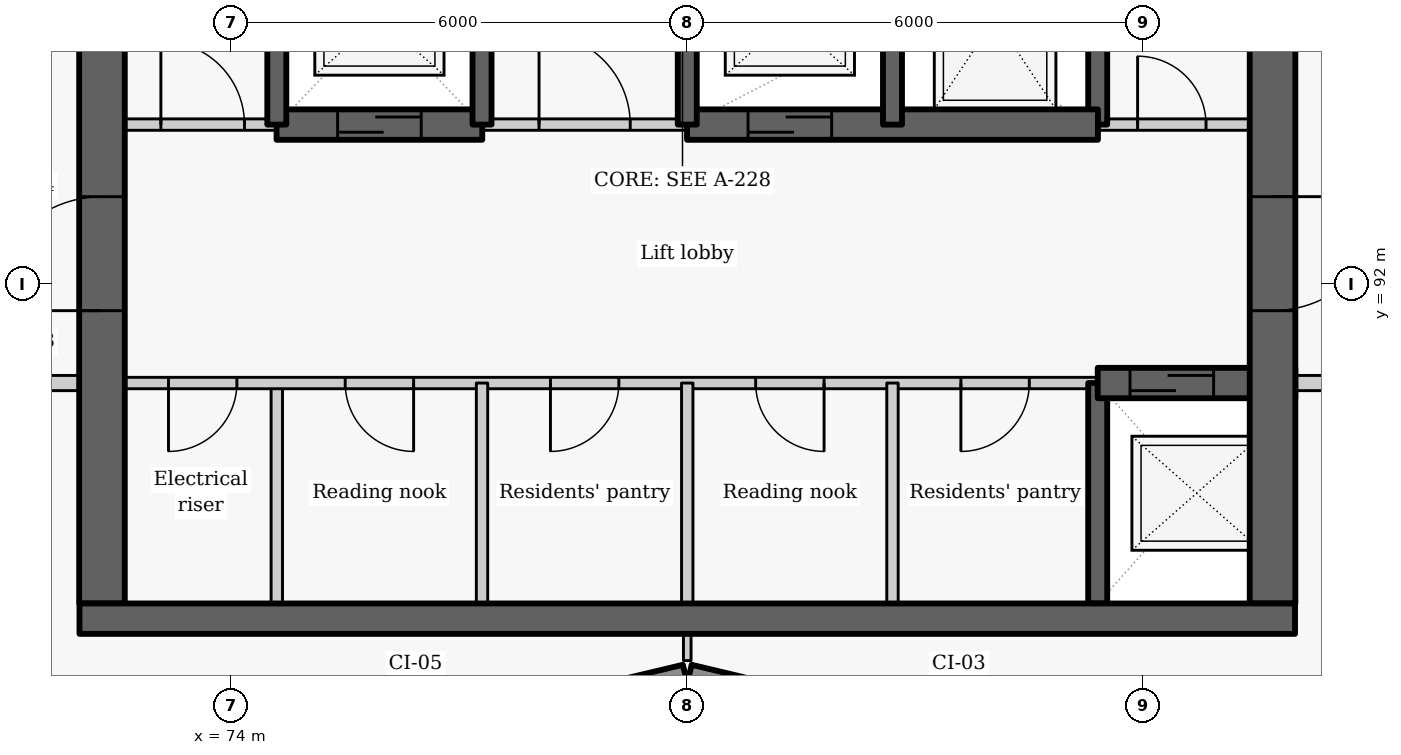
"""IFC4 building model, lengths in metres.
Left out: names, types, materials, properties, quantities, classifications, styles, units other than length and angle.
Written with IfcOpenShell. Run it as: python <this file> out.ifc"""

import sys

from ifc_helpers import new_model, si_unit, direction, frame, frame_2d, origin, place, context, subcontext, project, spatial, rectangle, extrude, element, fill, save


model = new_model("IFC4")
c1 = context("Model", 3, precision=1e-05, world=origin(), true_north=direction((0.0, 1.0)))
c2 = subcontext(c1, "Body", "Model", "MODEL_VIEW")
j1 = project(units=[si_unit("LENGTHUNIT", "METRE"), si_unit("PLANEANGLEUNIT", "RADIAN")], contexts=[c1])
p1 = place(None, origin())
s1 = spatial("IfcSite", under=j1, at=p1, CompositionType="ELEMENT")
p2 = place(p1, origin())
s2 = spatial("IfcBuilding", under=s1, at=p2, CompositionType="ELEMENT")
p3 = place(p2, frame((0.0, 0.0, 160.2)))
s3 = spatial("IfcBuildingStorey", under=s2, at=p3, CompositionType="ELEMENT", Elevation=160.2)
p4 = place(p3, frame((76.814, 86.119, 0.0), z_axis=(0.0, 0.0, 1.0), x_axis=(0.972773113459, 0.231759508395, 0.0)))
e1 = element("IfcWall", 1, at=p4, inside=s3, PredefinedType="SOLIDWALL", context=c2, shape_type="SweptSolid", body=[
    extrude(rectangle(XDim=3.246, YDim=0.25, at=frame_2d((1.623, 0.0))), origin(), (0.0, 0.0, 1.0), 2.425),
])
p5 = place(p4, frame((0.573, 0.0, 0.9)))
e2 = element("IfcOpeningElement", 2, at=p5, cuts=e1, PredefinedType="OPENING", context=c2, shape_type="SweptSolid", body=[
    extrude(rectangle(XDim=2.1, YDim=1.1, at=frame_2d((1.05, 0.55))), frame((0.0, 0.135, 0.0), z_axis=(0.0, -1.0, 0.0), x_axis=(1.0, 0.0, 0.0)), (0.0, 0.0, 1.0), 0.27),
])
p6 = place(p3, frame((80.029, 86.872, 0.0), z_axis=(0.0, 0.0, 1.0), x_axis=(0.972773113459, -0.231759508395, 0.0)))
e3 = element("IfcWall", 3, at=p6, inside=s3, PredefinedType="SOLIDWALL", context=c2, shape_type="SweptSolid", body=[
    extrude(rectangle(XDim=3.246, YDim=0.25, at=frame_2d((1.623, 0.0))), origin(), (0.0, 0.0, 1.0), 2.425),
])
p7 = place(p6, frame((0.573, 0.0, 0.9)))
e4 = element("IfcOpeningElement", 4, at=p7, cuts=e3, PredefinedType="OPENING", context=c2, shape_type="SweptSolid", body=[
    extrude(rectangle(XDim=2.1, YDim=1.1, at=frame_2d((1.05, 0.55))), frame((0.0, 0.135, 0.0), z_axis=(0.0, -1.0, 0.0), x_axis=(1.0, 0.0, 0.0)), (0.0, 0.0, 1.0), 0.27),
])
p8 = place(p3, frame((74.6, 87.8, 0.0), z_axis=(0.0, 0.0, 1.0), x_axis=(0.0, 1.0, 0.0)))
e5 = element("IfcWall", 5, at=p8, inside=s3, PredefinedType="PARTITIONING", context=c2, shape_type="SweptSolid", body=[
    extrude(rectangle(XDim=2.9, YDim=0.15, at=frame_2d((1.45, 0.0))), origin(), (0.0, 0.0, 1.0), 3.025),
])
p9 = place(p3, frame((85.4, 90.7, 0.0), z_axis=(0.0, 0.0, 1.0), x_axis=(-1.0, 0.0, 0.0)))
e6 = element("IfcWall", 6, at=p9, inside=s3, PredefinedType="PARTITIONING", context=c2, shape_type="SweptSolid", body=[
    extrude(rectangle(XDim=13.4, YDim=0.15, at=frame_2d((6.7, 0.0))), origin(), (0.0, 0.0, 1.0), 3.025),
])
p10 = place(p9, frame((11.325, 0.0, 0.0)))
e7 = element("IfcOpeningElement", 7, at=p10, cuts=e6, PredefinedType="OPENING", context=c2, shape_type="SweptSolid", body=[
    extrude(rectangle(XDim=0.9, YDim=2.1, at=frame_2d((0.45, 1.05))), frame((0.0, 0.085, 0.0), z_axis=(0.0, -1.0, 0.0), x_axis=(1.0, 0.0, 0.0)), (0.0, 0.0, 1.0), 0.17),
])
p11 = place(p9, frame((9.0, 0.0, 0.0)))
e8 = element("IfcOpeningElement", 8, at=p11, cuts=e6, PredefinedType="OPENING", context=c2, shape_type="SweptSolid", body=[
    extrude(rectangle(XDim=0.9, YDim=2.1, at=frame_2d((0.45, 1.05))), frame((0.0, 0.085, 0.0), z_axis=(0.0, -1.0, 0.0), x_axis=(1.0, 0.0, 0.0)), (0.0, 0.0, 1.0), 0.17),
])
p12 = place(p9, frame((6.3, 0.0, 0.0)))
e9 = element("IfcOpeningElement", 9, at=p12, cuts=e6, PredefinedType="OPENING", context=c2, shape_type="SweptSolid", body=[
    extrude(rectangle(XDim=0.9, YDim=2.1, at=frame_2d((0.45, 1.05))), frame((0.0, 0.085, 0.0), z_axis=(0.0, -1.0, 0.0), x_axis=(1.0, 0.0, 0.0)), (0.0, 0.0, 1.0), 0.17),
])
p13 = place(p9, frame((3.6, 0.0, 0.0)))
e10 = element("IfcOpeningElement", 10, at=p13, cuts=e6, PredefinedType="OPENING", context=c2, shape_type="SweptSolid", body=[
    extrude(rectangle(XDim=0.9, YDim=2.1, at=frame_2d((0.45, 1.05))), frame((0.0, 0.085, 0.0), z_axis=(0.0, -1.0, 0.0), x_axis=(1.0, 0.0, 0.0)), (0.0, 0.0, 1.0), 0.17),
])
p14 = place(p9, frame((0.9, 0.0, 0.0)))
e11 = element("IfcOpeningElement", 11, at=p14, cuts=e6, PredefinedType="OPENING", context=c2, shape_type="SweptSolid", body=[
    extrude(rectangle(XDim=0.9, YDim=2.1, at=frame_2d((0.45, 1.05))), frame((0.0, 0.085, 0.0), z_axis=(0.0, -1.0, 0.0), x_axis=(1.0, 0.0, 0.0)), (0.0, 0.0, 1.0), 0.17),
])
p15 = place(p3, frame((72.3, 87.8, -0.275), z_axis=(0.0, 0.0, 1.0), x_axis=(0.0, 1.0, 0.0)))
e12 = element("IfcWall", 12, at=p15, inside=s3, PredefinedType="SHEAR", context=c2, shape_type="SweptSolid", body=[
    extrude(rectangle(XDim=9.1, YDim=0.6, at=frame_2d((4.55, 0.0))), origin(), (0.0, 0.0, 1.0), 3.3),
])
p16 = place(p15, frame((3.852, 0.0, 0.275)))
e13 = element("IfcOpeningElement", 13, at=p16, cuts=e12, PredefinedType="OPENING", context=c2, shape_type="SweptSolid", body=[
    extrude(rectangle(XDim=1.5, YDim=2.1, at=frame_2d((0.75, 1.05))), frame((0.0, 0.31, 0.0), z_axis=(0.0, -1.0, 0.0), x_axis=(1.0, 0.0, 0.0)), (0.0, 0.0, 1.0), 0.62),
])
p17 = place(p3, frame((85.4, 87.8, -0.275), z_axis=(0.0, 0.0, 1.0), x_axis=(0.0, 1.0, 0.0)))
e14 = element("IfcWall", 14, at=p17, inside=s3, PredefinedType="SHEAR", context=c2, shape_type="SweptSolid", body=[
    extrude(rectangle(XDim=2.9, YDim=0.25, at=frame_2d((1.45, 0.0))), origin(), (0.0, 0.0, 1.0), 3.3),
])
p18 = place(p3, frame((85.4, 94.1, -0.275), z_axis=(0.0, 0.0, 1.0), x_axis=(0.0, 1.0, 0.0)))
e15 = element("IfcWall", 15, at=p18, inside=s3, PredefinedType="SHEAR", context=c2, shape_type="SweptSolid", body=[
    extrude(rectangle(XDim=2.8, YDim=0.25, at=frame_2d((1.4, 0.0))), origin(), (0.0, 0.0, 1.0), 3.3),
])
p19 = place(p3, frame((85.4, 90.7, -0.275), z_axis=(0.0, 0.0, 1.0), x_axis=(1.0, 0.0, 0.0)))
e16 = element("IfcWall", 16, at=p19, inside=s3, PredefinedType="SHEAR", context=c2, shape_type="SweptSolid", body=[
    extrude(rectangle(XDim=2.6, YDim=0.4, at=frame_2d((1.3, 0.0))), origin(), (0.0, 0.0, 1.0), 3.3),
])
p20 = place(p19, frame((0.425, 0.0, 0.275)))
e17 = element("IfcOpeningElement", 17, at=p20, cuts=e16, PredefinedType="OPENING", context=c2, shape_type="SweptSolid", body=[
    extrude(rectangle(XDim=1.1, YDim=2.1, at=frame_2d((0.55, 1.05))), frame((0.0, 0.21, 0.0), z_axis=(0.0, -1.0, 0.0), x_axis=(1.0, 0.0, 0.0)), (0.0, 0.0, 1.0), 0.42),
])
p21 = place(p3, frame((87.7, 103.4, -0.275), z_axis=(0.0, 0.0, 1.0), x_axis=(0.0, -1.0, 0.0)))
e18 = element("IfcWall", 18, at=p21, inside=s3, PredefinedType="SHEAR", context=c2, shape_type="SweptSolid", body=[
    extrude(rectangle(XDim=15.6, YDim=0.6, at=frame_2d((7.8, 0.0))), origin(), (0.0, 0.0, 1.0), 3.3),
])
p22 = place(p21, frame((10.248, 0.0, 0.275)))
e19 = element("IfcOpeningElement", 19, at=p22, cuts=e18, PredefinedType="OPENING", context=c2, shape_type="SweptSolid", body=[
    extrude(rectangle(XDim=1.5, YDim=2.1, at=frame_2d((0.75, 1.05))), frame((0.0, 0.31, 0.0), z_axis=(0.0, -1.0, 0.0), x_axis=(1.0, 0.0, 0.0)), (0.0, 0.0, 1.0), 0.62),
])
for number, where, z_axis, x_axis in (
    (20, (77.3, 87.8, 0.0), (0.0, 0.0, 1.0), (0.0, 1.0, 0.0)),
    (21, (80.0, 87.8, 0.0), (0.0, 0.0, 1.0), (0.0, 1.0, 0.0)),
    (22, (82.7, 87.8, 0.0), (0.0, 0.0, 1.0), (0.0, 1.0, 0.0)),
):
    element("IfcWall", number, at=place(p3, frame(where, z_axis=z_axis, x_axis=x_axis)), inside=s3, PredefinedType="PARTITIONING", context=c2, shape_type="SweptSolid", body=[
        extrude(rectangle(XDim=2.9, YDim=0.15, at=frame_2d((1.45, 0.0))), origin(), (0.0, 0.0, 1.0), 3.025),
    ])
p23 = place(p3, frame((72.0, 94.1, 0.0), z_axis=(0.0, 0.0, 1.0), x_axis=(1.0, 0.0, 0.0)))
e23 = element("IfcWall", 23, at=p23, inside=s3, PredefinedType="PARTITIONING", context=c2, shape_type="SweptSolid", body=[
    extrude(rectangle(XDim=2.603, YDim=0.15, at=frame_2d((1.302, 0.0))), origin(), (0.0, 0.0, 1.0), 3.025),
])
p24 = place(p23, frame((1.075, 0.0, 0.0)))
e24 = element("IfcOpeningElement", 24, at=p24, cuts=e23, PredefinedType="OPENING", context=c2, shape_type="SweptSolid", body=[
    extrude(rectangle(XDim=1.1, YDim=2.1, at=frame_2d((0.55, 1.05))), frame((0.0, 0.085, 0.0), z_axis=(0.0, -1.0, 0.0), x_axis=(1.0, 0.0, 0.0)), (0.0, 0.0, 1.0), 0.17),
])
p25 = place(p3, frame((77.297, 94.1, 0.0), z_axis=(0.0, 0.0, 1.0), x_axis=(1.0, 0.0, 0.0)))
e25 = element("IfcWall", 25, at=p25, inside=s3, PredefinedType="PARTITIONING", context=c2, shape_type="SweptSolid", body=[
    extrude(rectangle(XDim=2.706, YDim=0.15, at=frame_2d((1.353, 0.0))), origin(), (0.0, 0.0, 1.0), 3.025),
])
p26 = place(p25, frame((0.753, 0.0, 0.0)))
e26 = element("IfcOpeningElement", 26, at=p26, cuts=e25, PredefinedType="OPENING", context=c2, shape_type="SweptSolid", body=[
    extrude(rectangle(XDim=1.2, YDim=2.1, at=frame_2d((0.6, 1.05))), frame((0.0, 0.085, 0.0), z_axis=(0.0, -1.0, 0.0), x_axis=(1.0, 0.0, 0.0)), (0.0, 0.0, 1.0), 0.17),
])
p27 = place(p3, frame((85.397, 94.1, 0.0), z_axis=(0.0, 0.0, 1.0), x_axis=(1.0, 0.0, 0.0)))
e27 = element("IfcWall", 27, at=p27, inside=s3, PredefinedType="PARTITIONING", context=c2, shape_type="SweptSolid", body=[
    extrude(rectangle(XDim=2.603, YDim=0.15, at=frame_2d((1.302, 0.0))), origin(), (0.0, 0.0, 1.0), 3.025),
])
p28 = place(p27, frame((0.528, 0.0, 0.0)))
e28 = element("IfcOpeningElement", 28, at=p28, cuts=e27, PredefinedType="OPENING", context=c2, shape_type="SweptSolid", body=[
    extrude(rectangle(XDim=0.9, YDim=2.1, at=frame_2d((0.45, 1.05))), frame((0.0, 0.085, 0.0), z_axis=(0.0, -1.0, 0.0), x_axis=(1.0, 0.0, 0.0)), (0.0, 0.0, 1.0), 0.17),
])
p29 = place(p3, frame((74.597, 94.1, -0.275), z_axis=(0.0, 0.0, 1.0), x_axis=(1.0, 0.0, 0.0)))
e29 = element("IfcWall", 29, at=p29, inside=s3, PredefinedType="SHEAR", context=c2, shape_type="SweptSolid", body=[
    extrude(rectangle(XDim=2.706, YDim=0.4, at=frame_2d((1.353, 0.0))), origin(), (0.0, 0.0, 1.0), 3.3),
])
p30 = place(p29, frame((0.803, 0.0, 0.275)))
e30 = element("IfcOpeningElement", 30, at=p30, cuts=e29, PredefinedType="OPENING", context=c2, shape_type="SweptSolid", body=[
    extrude(rectangle(XDim=1.1, YDim=2.1, at=frame_2d((0.55, 1.05))), frame((0.0, 0.21, 0.0), z_axis=(0.0, -1.0, 0.0), x_axis=(1.0, 0.0, 0.0)), (0.0, 0.0, 1.0), 0.42),
])
p31 = place(p3, frame((79.997, 94.1, -0.275), z_axis=(0.0, 0.0, 1.0), x_axis=(1.0, 0.0, 0.0)))
e31 = element("IfcWall", 31, at=p31, inside=s3, PredefinedType="SHEAR", context=c2, shape_type="SweptSolid", body=[
    extrude(rectangle(XDim=5.406, YDim=0.4, at=frame_2d((2.703, 0.0))), origin(), (0.0, 0.0, 1.0), 3.3),
])
p32 = place(p31, frame((0.803, 0.0, 0.275)))
e32 = element("IfcOpeningElement", 32, at=p32, cuts=e31, PredefinedType="OPENING", context=c2, shape_type="SweptSolid", body=[
    extrude(rectangle(XDim=1.1, YDim=2.1, at=frame_2d((0.55, 1.05))), frame((0.0, 0.21, 0.0), z_axis=(0.0, -1.0, 0.0), x_axis=(1.0, 0.0, 0.0)), (0.0, 0.0, 1.0), 0.42),
])
for number, where, z_axis, x_axis in (
    (33, (74.6, 94.1, -0.275), (0.0, 0.0, 1.0), (0.0, 1.0, 0.0)),
    (34, (77.3, 94.1, -0.275), (0.0, 0.0, 1.0), (0.0, 1.0, 0.0)),
    (35, (80.0, 94.1, -0.275), (0.0, 0.0, 1.0), (0.0, 1.0, 0.0)),
    (36, (82.7, 94.1, -0.275), (0.0, 0.0, 1.0), (0.0, 1.0, 0.0)),
):
    element("IfcWall", number, at=place(p3, frame(where, z_axis=z_axis, x_axis=x_axis)), inside=s3, PredefinedType="SHEAR", context=c2, shape_type="SweptSolid", body=[
        extrude(rectangle(XDim=2.8, YDim=0.25, at=frame_2d((1.4, 0.0))), origin(), (0.0, 0.0, 1.0), 3.3),
    ])
for number, where, z_axis, x_axis in (
    (37, (70.45, 90.7, 0.0), (0.0, 0.0, 1.0), (1.0, 0.0, 0.0)),
    (38, (88.0, 90.7, 0.0), (0.0, 0.0, 1.0), (1.0, 0.0, 0.0)),
):
    element("IfcWall", number, at=place(p3, frame(where, z_axis=z_axis, x_axis=x_axis)), inside=s3, PredefinedType="PARTITIONING", context=c2, shape_type="SweptSolid", body=[
        extrude(rectangle(XDim=1.55, YDim=0.2, at=frame_2d((0.775, 0.0))), origin(), (0.0, 0.0, 1.0), 3.025),
    ])
p33 = place(p3, frame((80.0, 87.048, 0.0), z_axis=(0.0, 0.0, 1.0), x_axis=(0.0, 1.0, 0.0)))
e39 = element("IfcWall", 39, at=p33, inside=s3, PredefinedType="PARTITIONING", context=c2, shape_type="SweptSolid", body=[
    extrude(rectangle(XDim=0.352, YDim=0.1, at=frame_2d((0.176, 0.0))), origin(), (0.0, 0.0, 1.0), 3.025),
])
p34 = place(p3, frame((72.004, 87.6, -0.275), z_axis=(0.0, 0.0, 1.0), x_axis=(1.0, 0.0, 0.0)))
e40 = element("IfcWall", 40, at=p34, inside=s3, PredefinedType="SHEAR", context=c2, shape_type="SweptSolid", body=[
    extrude(rectangle(XDim=15.992, YDim=0.4, at=frame_2d((7.996, 0.0))), origin(), (0.0, 0.0, 1.0), 3.3),
])
p35 = place(p10, origin())
e41 = element("IfcDoor", 41, at=p35, inside=s3, OperationType="SINGLE_SWING_RIGHT", PredefinedType="DOOR", context=c2, shape_type="SweptSolid", body=[
    extrude(rectangle(XDim=0.9, YDim=2.1, at=frame_2d((0.45, 1.05))), frame((0.0, 0.025, 0.0), z_axis=(0.0, -1.0, 0.0), x_axis=(1.0, 0.0, 0.0)), (0.0, 0.0, 1.0), 0.05),
])
fill(e7, e41)
p36 = place(p20, origin())
e42 = element("IfcDoor", 42, at=p36, inside=s3, OperationType="SLIDING_TO_LEFT", PredefinedType="DOOR", context=c2, shape_type="SweptSolid", body=[
    extrude(rectangle(XDim=1.1, YDim=2.1, at=frame_2d((0.55, 1.05))), frame((0.0, 0.025, 0.0), z_axis=(0.0, -1.0, 0.0), x_axis=(1.0, 0.0, 0.0)), (0.0, 0.0, 1.0), 0.05),
])
fill(e17, e42)
p37 = place(p11, origin())
e43 = element("IfcDoor", 43, at=p37, inside=s3, OperationType="SINGLE_SWING_LEFT", PredefinedType="DOOR", context=c2, shape_type="SweptSolid", body=[
    extrude(rectangle(XDim=0.9, YDim=2.1, at=frame_2d((0.45, 1.05))), frame((0.0, 0.025, 0.0), z_axis=(0.0, -1.0, 0.0), x_axis=(1.0, 0.0, 0.0)), (0.0, 0.0, 1.0), 0.05),
])
fill(e8, e43)
p38 = place(p12, origin())
e44 = element("IfcDoor", 44, at=p38, inside=s3, OperationType="SINGLE_SWING_RIGHT", PredefinedType="DOOR", context=c2, shape_type="SweptSolid", body=[
    extrude(rectangle(XDim=0.9, YDim=2.1, at=frame_2d((0.45, 1.05))), frame((0.0, 0.025, 0.0), z_axis=(0.0, -1.0, 0.0), x_axis=(1.0, 0.0, 0.0)), (0.0, 0.0, 1.0), 0.05),
])
fill(e9, e44)
p39 = place(p13, origin())
e45 = element("IfcDoor", 45, at=p39, inside=s3, OperationType="SINGLE_SWING_LEFT", PredefinedType="DOOR", context=c2, shape_type="SweptSolid", body=[
    extrude(rectangle(XDim=0.9, YDim=2.1, at=frame_2d((0.45, 1.05))), frame((0.0, 0.025, 0.0), z_axis=(0.0, -1.0, 0.0), x_axis=(1.0, 0.0, 0.0)), (0.0, 0.0, 1.0), 0.05),
])
fill(e10, e45)
p40 = place(p14, origin())
e46 = element("IfcDoor", 46, at=p40, inside=s3, OperationType="SINGLE_SWING_RIGHT", PredefinedType="DOOR", context=c2, shape_type="SweptSolid", body=[
    extrude(rectangle(XDim=0.9, YDim=2.1, at=frame_2d((0.45, 1.05))), frame((0.0, 0.025, 0.0), z_axis=(0.0, -1.0, 0.0), x_axis=(1.0, 0.0, 0.0)), (0.0, 0.0, 1.0), 0.05),
])
fill(e11, e46)
p41 = place(p24, origin())
e47 = element("IfcDoor", 47, at=p41, inside=s3, OperationType="SINGLE_SWING_LEFT", PredefinedType="DOOR", context=c2, shape_type="SweptSolid", body=[
    extrude(rectangle(XDim=1.1, YDim=2.1, at=frame_2d((0.55, 1.05))), frame((0.0, 0.025, 0.0), z_axis=(0.0, -1.0, 0.0), x_axis=(1.0, 0.0, 0.0)), (0.0, 0.0, 1.0), 0.05),
])
fill(e24, e47)
p42 = place(p30, origin())
e48 = element("IfcDoor", 48, at=p42, inside=s3, OperationType="SLIDING_TO_LEFT", PredefinedType="DOOR", context=c2, shape_type="SweptSolid", body=[
    extrude(rectangle(XDim=1.1, YDim=2.1, at=frame_2d((0.55, 1.05))), frame((0.0, 0.025, 0.0), z_axis=(0.0, -1.0, 0.0), x_axis=(1.0, 0.0, 0.0)), (0.0, 0.0, 1.0), 0.05),
])
fill(e30, e48)
p43 = place(p26, origin())
e49 = element("IfcDoor", 49, at=p43, inside=s3, OperationType="DOUBLE_DOOR_SINGLE_SWING", PredefinedType="DOOR", context=c2, shape_type="SweptSolid", body=[
    extrude(rectangle(XDim=1.2, YDim=2.1, at=frame_2d((0.6, 1.05))), frame((0.0, 0.025, 0.0), z_axis=(0.0, -1.0, 0.0), x_axis=(1.0, 0.0, 0.0)), (0.0, 0.0, 1.0), 0.05),
])
fill(e26, e49)
p44 = place(p32, origin())
e50 = element("IfcDoor", 50, at=p44, inside=s3, OperationType="SLIDING_TO_LEFT", PredefinedType="DOOR", context=c2, shape_type="SweptSolid", body=[
    extrude(rectangle(XDim=1.1, YDim=2.1, at=frame_2d((0.55, 1.05))), frame((0.0, 0.025, 0.0), z_axis=(0.0, -1.0, 0.0), x_axis=(1.0, 0.0, 0.0)), (0.0, 0.0, 1.0), 0.05),
])
fill(e32, e50)
p45 = place(p28, origin())
e51 = element("IfcDoor", 51, at=p45, inside=s3, OperationType="SINGLE_SWING_LEFT", PredefinedType="DOOR", context=c2, shape_type="SweptSolid", body=[
    extrude(rectangle(XDim=0.9, YDim=2.1, at=frame_2d((0.45, 1.05))), frame((0.0, 0.025, 0.0), z_axis=(0.0, -1.0, 0.0), x_axis=(1.0, 0.0, 0.0)), (0.0, 0.0, 1.0), 0.05),
])
fill(e28, e51)
p46 = place(p22, origin())
e52 = element("IfcDoor", 52, at=p46, inside=s3, OperationType="DOUBLE_DOOR_SINGLE_SWING", PredefinedType="DOOR", context=c2, shape_type="SweptSolid", body=[
    extrude(rectangle(XDim=1.5, YDim=2.1, at=frame_2d((0.75, 1.05))), frame((0.0, 0.025, 0.0), z_axis=(0.0, -1.0, 0.0), x_axis=(1.0, 0.0, 0.0)), (0.0, 0.0, 1.0), 0.05),
])
fill(e19, e52)
p47 = place(p16, origin())
e53 = element("IfcDoor", 53, at=p47, inside=s3, OperationType="DOUBLE_DOOR_SINGLE_SWING", PredefinedType="DOOR", context=c2, shape_type="SweptSolid", body=[
    extrude(rectangle(XDim=1.5, YDim=2.1, at=frame_2d((0.75, 1.05))), frame((0.0, 0.025, 0.0), z_axis=(0.0, -1.0, 0.0), x_axis=(1.0, 0.0, 0.0)), (0.0, 0.0, 1.0), 0.05),
])
fill(e13, e53)
save(model, sys.argv[1])
